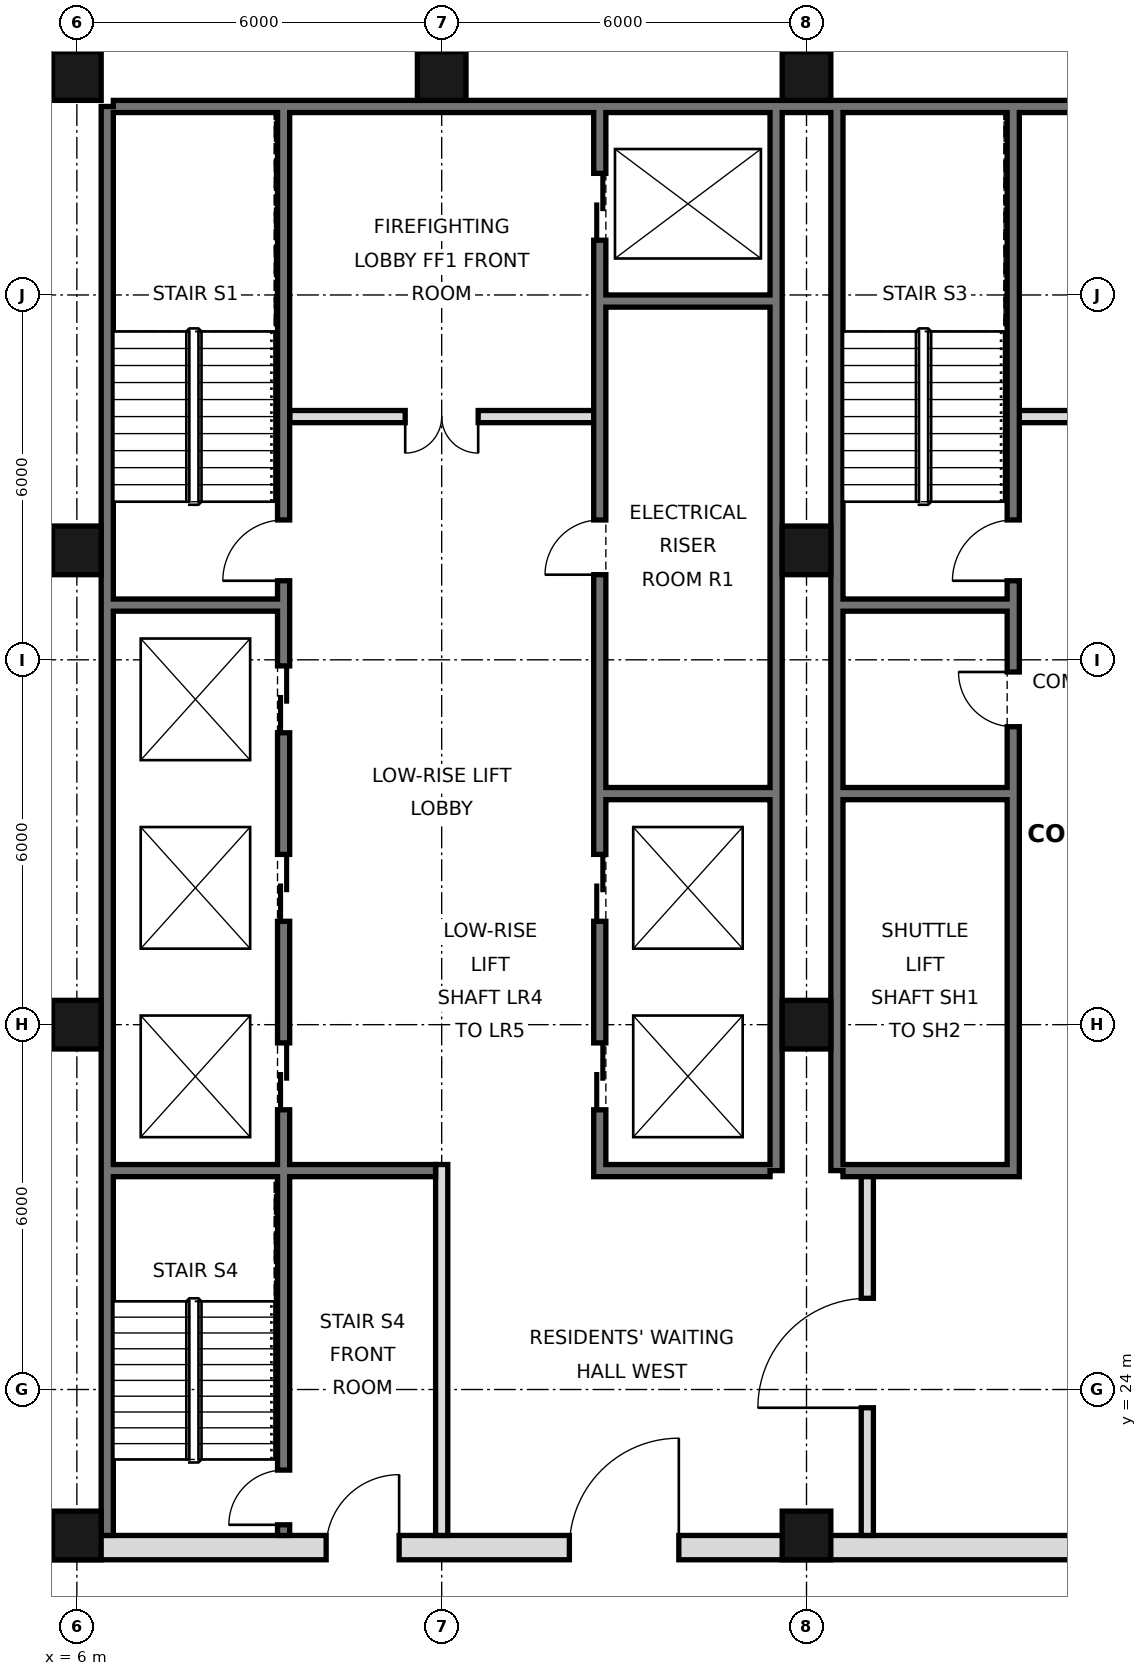
"""IFC4 building model, lengths in metres.
Left out: names, types, materials, properties, quantities, classifications, styles, units other than length and angle.
Written with IfcOpenShell. Run it as: python <this file> out.ifc"""

import sys

from ifc_helpers import new_model, si_unit, direction, frame, frame_2d, origin, origin_2d, place, context, subcontext, project, spatial, rectangle, hollow_rectangle, extrude, element, fill, save


model = new_model("IFC4")
c1 = context("Model", 3, precision=1e-05, world=origin(), true_north=direction((0.0, 1.0)))
c2 = subcontext(c1, "Body", "Model", "MODEL_VIEW")
j1 = project(units=[si_unit("LENGTHUNIT", "METRE"), si_unit("PLANEANGLEUNIT", "RADIAN")], contexts=[c1])
p1 = place(None, origin())
s1 = spatial("IfcSite", under=j1, at=p1, CompositionType="ELEMENT")
p2 = place(p1, origin())
s2 = spatial("IfcBuilding", under=s1, at=p2, CompositionType="ELEMENT")
p3 = place(p2, frame((0.0, 0.0, 158.2)))
s3 = spatial("IfcBuildingStorey", under=s2, at=p3, CompositionType="ELEMENT", Elevation=158.2)
for number, where, z_axis, x_axis in (
    (1, (6.0, 21.6, 0.0), (0.0, 0.0, 1.0), (1.0, 0.0, 0.0)),
    (2, (6.0, 30.0, 0.0), (0.0, 0.0, 1.0), (1.0, 0.0, 0.0)),
    (3, (6.0, 37.8, 0.0), (0.0, 0.0, 1.0), (1.0, 0.0, 0.0)),
    (4, (6.0, 45.6, 0.0), (0.0, 0.0, 1.0), (1.0, 0.0, 0.0)),
    (5, (12.0, 45.6, 0.0), (0.0, 0.0, 1.0), (1.0, 0.0, 0.0)),
    (6, (18.0, 21.6, 0.0), (0.0, 0.0, 1.0), (1.0, 0.0, 0.0)),
    (7, (18.0, 30.0, 0.0), (0.0, 0.0, 1.0), (1.0, 0.0, 0.0)),
    (8, (18.0, 37.8, 0.0), (0.0, 0.0, 1.0), (1.0, 0.0, 0.0)),
    (9, (18.0, 45.6, 0.0), (0.0, 0.0, 1.0), (1.0, 0.0, 0.0)),
):
    element("IfcColumn", number, at=place(p3, frame(where, z_axis=z_axis, x_axis=x_axis)), inside=s3, PredefinedType="COLUMN", context=c2, shape_type="SweptSolid", body=[
        extrude(hollow_rectangle(XDim=0.8, YDim=0.8, WallThickness=0.045, at=origin_2d()), origin(), (0.0, 0.0, 1.0), 3.6),
    ])
p4 = place(p3, frame((6.5, 21.6, 0.0), z_axis=(0.0, 0.0, 1.0), x_axis=(0.0, 1.0, 0.0)))
e10 = element("IfcWall", 10, at=p4, inside=s3, PredefinedType="SOLIDWALL", context=c2, shape_type="SweptSolid", body=[
    extrude(rectangle(XDim=23.5, YDim=0.2, at=frame_2d((11.75, 0.0))), origin(), (0.0, 0.0, 1.0), 3.38),
])
p5 = place(p3, frame((6.6, 45.1, 0.0), z_axis=(0.0, 0.0, 1.0), x_axis=(1.0, 0.0, 0.0)))
e11 = element("IfcWall", 11, at=p5, inside=s3, PredefinedType="SOLIDWALL", context=c2, shape_type="SweptSolid", body=[
    extrude(rectangle(XDim=34.8, YDim=0.2, at=frame_2d((17.4, 0.0))), origin(), (0.0, 0.0, 1.0), 3.38),
])
for number, where, z_axis, x_axis in (
    (12, (17.5, 27.6, 0.0), (0.0, 0.0, 1.0), (0.0, 1.0, 0.0)),
    (13, (18.5, 27.6, 0.0), (0.0, 0.0, 1.0), (0.0, 1.0, 0.0)),
):
    element("IfcWall", number, at=place(p3, frame(where, z_axis=z_axis, x_axis=x_axis)), inside=s3, PredefinedType="SOLIDWALL", context=c2, shape_type="SweptSolid", body=[
        extrude(rectangle(XDim=17.5, YDim=0.2, at=frame_2d((8.75, 0.0))), origin(), (0.0, 0.0, 1.0), 3.38),
    ])
p6 = place(p3, frame((5.6, 21.4, 0.0), z_axis=(0.0, 0.0, 1.0), x_axis=(1.0, 0.0, 0.0)))
e14 = element("IfcWall", 14, at=p6, inside=s3, PredefinedType="SOLIDWALL", context=c2, shape_type="SweptSolid", body=[
    extrude(rectangle(XDim=36.8, YDim=0.4, at=frame_2d((18.4, 0.0))), origin(), (0.0, 0.0, 1.0), 3.38),
])
p7 = place(p6, frame((8.5, 0.0, 0.0)))
e15 = element("IfcOpeningElement", 15, at=p7, cuts=e14, PredefinedType="OPENING", context=c2, shape_type="SweptSolid", body=[
    extrude(rectangle(XDim=1.8, YDim=2.1, at=frame_2d((0.9, 1.05))), frame((0.0, 0.21, 0.0), z_axis=(0.0, -1.0, 0.0), x_axis=(1.0, 0.0, 0.0)), (0.0, 0.0, 1.0), 0.42),
])
p8 = place(p6, frame((17.5, 0.0, 0.0)))
e16 = element("IfcOpeningElement", 16, at=p8, cuts=e14, PredefinedType="OPENING", context=c2, shape_type="SweptSolid", body=[
    extrude(rectangle(XDim=1.8, YDim=2.1, at=frame_2d((0.9, 1.05))), frame((0.0, 0.21, 0.0), z_axis=(0.0, -1.0, 0.0), x_axis=(1.0, 0.0, 0.0)), (0.0, 0.0, 1.0), 0.42),
])
p9 = place(p6, frame((26.5, 0.0, 0.0)))
e17 = element("IfcOpeningElement", 17, at=p9, cuts=e14, PredefinedType="OPENING", context=c2, shape_type="SweptSolid", body=[
    extrude(rectangle(XDim=1.8, YDim=2.1, at=frame_2d((0.9, 1.05))), frame((0.0, 0.21, 0.0), z_axis=(0.0, -1.0, 0.0), x_axis=(1.0, 0.0, 0.0)), (0.0, 0.0, 1.0), 0.42),
])
p10 = place(p6, frame((4.5, 0.0, 0.0)))
e18 = element("IfcOpeningElement", 18, at=p10, cuts=e14, PredefinedType="OPENING", context=c2, shape_type="SweptSolid", body=[
    extrude(rectangle(XDim=1.2, YDim=2.1, at=frame_2d((0.6, 1.05))), frame((0.0, 0.21, 0.0), z_axis=(0.0, -1.0, 0.0), x_axis=(1.0, 0.0, 0.0)), (0.0, 0.0, 1.0), 0.42),
])
p11 = place(p6, frame((31.1, 0.0, 0.0)))
e19 = element("IfcOpeningElement", 19, at=p11, cuts=e14, PredefinedType="OPENING", context=c2, shape_type="SweptSolid", body=[
    extrude(rectangle(XDim=1.2, YDim=2.1, at=frame_2d((0.6, 1.05))), frame((0.0, 0.21, 0.0), z_axis=(0.0, -1.0, 0.0), x_axis=(1.0, 0.0, 0.0)), (0.0, 0.0, 1.0), 0.42),
])
p12 = place(p3, frame((19.0, 21.6, 0.0), z_axis=(0.0, 0.0, 1.0), x_axis=(0.0, 1.0, 0.0)))
e20 = element("IfcWall", 20, at=p12, inside=s3, PredefinedType="PARTITIONING", context=c2, shape_type="SweptSolid", body=[
    extrude(rectangle(XDim=6.0, YDim=0.2, at=frame_2d((3.0, 0.0))), origin(), (0.0, 0.0, 1.0), 3.38),
])
p13 = place(p12, frame((2.1, 0.0, 0.0)))
e21 = element("IfcOpeningElement", 21, at=p13, cuts=e20, PredefinedType="OPENING", context=c2, shape_type="SweptSolid", body=[
    extrude(rectangle(XDim=1.8, YDim=2.1, at=frame_2d((0.9, 1.05))), frame((0.0, 0.11, 0.0), z_axis=(0.0, -1.0, 0.0), x_axis=(1.0, 0.0, 0.0)), (0.0, 0.0, 1.0), 0.22),
])
p14 = place(p3, frame((12.0, 21.6, 0.0), z_axis=(0.0, 0.0, 1.0), x_axis=(0.0, 1.0, 0.0)))
e22 = element("IfcWall", 22, at=p14, inside=s3, PredefinedType="PARTITIONING", context=c2, shape_type="SweptSolid", body=[
    extrude(rectangle(XDim=6.1, YDim=0.2, at=frame_2d((3.05, 0.0))), origin(), (0.0, 0.0, 1.0), 3.38),
])
p15 = place(p3, frame((14.6, 27.5, 0.0), z_axis=(0.0, 0.0, 1.0), x_axis=(0.0, 1.0, 0.0)))
e23 = element("IfcWall", 23, at=p15, inside=s3, PredefinedType="SOLIDWALL", context=c2, shape_type="SweptSolid", body=[
    extrude(rectangle(XDim=17.5, YDim=0.2, at=frame_2d((8.75, 0.0))), origin(), (0.0, 0.0, 1.0), 3.38),
])
p16 = place(p15, frame((1.1, 0.0, 0.0)))
e24 = element("IfcOpeningElement", 24, at=p16, cuts=e23, PredefinedType="OPENING", context=c2, shape_type="SweptSolid", body=[
    extrude(rectangle(XDim=1.1, YDim=2.1, at=frame_2d((0.55, 1.05))), frame((0.0, 0.11, 0.0), z_axis=(0.0, -1.0, 0.0), x_axis=(1.0, 0.0, 0.0)), (0.0, 0.0, 1.0), 0.22),
])
p17 = place(p15, frame((4.2, 0.0, 0.0)))
e25 = element("IfcOpeningElement", 25, at=p17, cuts=e23, PredefinedType="OPENING", context=c2, shape_type="SweptSolid", body=[
    extrude(rectangle(XDim=1.1, YDim=2.1, at=frame_2d((0.55, 1.05))), frame((0.0, 0.11, 0.0), z_axis=(0.0, -1.0, 0.0), x_axis=(1.0, 0.0, 0.0)), (0.0, 0.0, 1.0), 0.22),
])
p18 = place(p15, frame((15.4, 0.0, 0.0)))
e26 = element("IfcOpeningElement", 26, at=p18, cuts=e23, PredefinedType="OPENING", context=c2, shape_type="SweptSolid", body=[
    extrude(rectangle(XDim=1.1, YDim=2.1, at=frame_2d((0.55, 1.05))), frame((0.0, 0.11, 0.0), z_axis=(0.0, -1.0, 0.0), x_axis=(1.0, 0.0, 0.0)), (0.0, 0.0, 1.0), 0.22),
])
p19 = place(p15, frame((9.9, 0.0, 0.0)))
e27 = element("IfcOpeningElement", 27, at=p19, cuts=e23, PredefinedType="OPENING", context=c2, shape_type="SweptSolid", body=[
    extrude(rectangle(XDim=0.9, YDim=2.1, at=frame_2d((0.45, 1.05))), frame((0.0, 0.11, 0.0), z_axis=(0.0, -1.0, 0.0), x_axis=(1.0, 0.0, 0.0)), (0.0, 0.0, 1.0), 0.22),
])
p20 = place(p3, frame((21.4, 27.5, 0.0), z_axis=(0.0, 0.0, 1.0), x_axis=(0.0, 1.0, 0.0)))
e28 = element("IfcWall", 28, at=p20, inside=s3, PredefinedType="SOLIDWALL", context=c2, shape_type="SweptSolid", body=[
    extrude(rectangle(XDim=17.5, YDim=0.2, at=frame_2d((8.75, 0.0))), origin(), (0.0, 0.0, 1.0), 3.38),
])
p21 = place(p20, frame((9.8, 0.0, 0.0)))
e29 = element("IfcOpeningElement", 29, at=p21, cuts=e28, PredefinedType="OPENING", context=c2, shape_type="SweptSolid", body=[
    extrude(rectangle(XDim=1.0, YDim=2.1, at=frame_2d((0.5, 1.05))), frame((0.0, 0.11, 0.0), z_axis=(0.0, -1.0, 0.0), x_axis=(1.0, 0.0, 0.0)), (0.0, 0.0, 1.0), 0.22),
])
p22 = place(p20, frame((7.4, 0.0, 0.0)))
e30 = element("IfcOpeningElement", 30, at=p22, cuts=e28, PredefinedType="OPENING", context=c2, shape_type="SweptSolid", body=[
    extrude(rectangle(XDim=0.9, YDim=2.1, at=frame_2d((0.45, 1.05))), frame((0.0, 0.11, 0.0), z_axis=(0.0, -1.0, 0.0), x_axis=(1.0, 0.0, 0.0)), (0.0, 0.0, 1.0), 0.22),
])
p23 = place(p3, frame((9.4, 21.6, 0.0), z_axis=(0.0, 0.0, 1.0), x_axis=(0.0, 1.0, 0.0)))
e31 = element("IfcWall", 31, at=p23, inside=s3, PredefinedType="SOLIDWALL", context=c2, shape_type="SweptSolid", body=[
    extrude(rectangle(XDim=23.4, YDim=0.2, at=frame_2d((11.7, 0.0))), origin(), (0.0, 0.0, 1.0), 3.38),
])
p24 = place(p23, frame((7.0, 0.0, 0.0)))
e32 = element("IfcOpeningElement", 32, at=p24, cuts=e31, PredefinedType="OPENING", context=c2, shape_type="SweptSolid", body=[
    extrude(rectangle(XDim=1.1, YDim=2.1, at=frame_2d((0.55, 1.05))), frame((0.0, 0.11, 0.0), z_axis=(0.0, -1.0, 0.0), x_axis=(1.0, 0.0, 0.0)), (0.0, 0.0, 1.0), 0.22),
])
p25 = place(p23, frame((10.1, 0.0, 0.0)))
e33 = element("IfcOpeningElement", 33, at=p25, cuts=e31, PredefinedType="OPENING", context=c2, shape_type="SweptSolid", body=[
    extrude(rectangle(XDim=1.1, YDim=2.1, at=frame_2d((0.55, 1.05))), frame((0.0, 0.11, 0.0), z_axis=(0.0, -1.0, 0.0), x_axis=(1.0, 0.0, 0.0)), (0.0, 0.0, 1.0), 0.22),
])
p26 = place(p23, frame((13.2, 0.0, 0.0)))
e34 = element("IfcOpeningElement", 34, at=p26, cuts=e31, PredefinedType="OPENING", context=c2, shape_type="SweptSolid", body=[
    extrude(rectangle(XDim=1.1, YDim=2.1, at=frame_2d((0.55, 1.05))), frame((0.0, 0.11, 0.0), z_axis=(0.0, -1.0, 0.0), x_axis=(1.0, 0.0, 0.0)), (0.0, 0.0, 1.0), 0.22),
])
p27 = place(p23, frame((15.7, 0.0, 0.0)))
e35 = element("IfcOpeningElement", 35, at=p27, cuts=e31, PredefinedType="OPENING", context=c2, shape_type="SweptSolid", body=[
    extrude(rectangle(XDim=1.0, YDim=2.1, at=frame_2d((0.5, 1.05))), frame((0.0, 0.11, 0.0), z_axis=(0.0, -1.0, 0.0), x_axis=(1.0, 0.0, 0.0)), (0.0, 0.0, 1.0), 0.22),
])
p28 = place(p23, frame((0.175, 0.0, 0.0)))
e36 = element("IfcOpeningElement", 36, at=p28, cuts=e31, PredefinedType="OPENING", context=c2, shape_type="SweptSolid", body=[
    extrude(rectangle(XDim=0.9, YDim=2.1, at=frame_2d((0.45, 1.05))), frame((0.0, 0.11, 0.0), z_axis=(0.0, -1.0, 0.0), x_axis=(1.0, 0.0, 0.0)), (0.0, 0.0, 1.0), 0.22),
])
for number, where, z_axis, x_axis in (
    (37, (14.7, 27.6, 0.0), (0.0, 0.0, 1.0), (1.0, 0.0, 0.0)),
    (38, (18.6, 27.6, 0.0), (0.0, 0.0, 1.0), (1.0, 0.0, 0.0)),
):
    element("IfcWall", number, at=place(p3, frame(where, z_axis=z_axis, x_axis=x_axis)), inside=s3, PredefinedType="SOLIDWALL", context=c2, shape_type="SweptSolid", body=[
        extrude(rectangle(XDim=2.7, YDim=0.2, at=frame_2d((1.35, 0.0))), origin(), (0.0, 0.0, 1.0), 3.38),
    ])
p29 = place(p3, frame((6.6, 27.6, 0.0), z_axis=(0.0, 0.0, 1.0), x_axis=(1.0, 0.0, 0.0)))
e39 = element("IfcWall", 39, at=p29, inside=s3, PredefinedType="SOLIDWALL", context=c2, shape_type="SweptSolid", body=[
    extrude(rectangle(XDim=5.3, YDim=0.2, at=frame_2d((2.65, 0.0))), origin(), (0.0, 0.0, 1.0), 3.38),
])
for number, where, z_axis, x_axis in (
    (40, (14.7, 33.8, 0.0), (0.0, 0.0, 1.0), (1.0, 0.0, 0.0)),
    (41, (18.6, 33.8, 0.0), (0.0, 0.0, 1.0), (1.0, 0.0, 0.0)),
    (42, (18.6, 36.9, 0.0), (0.0, 0.0, 1.0), (1.0, 0.0, 0.0)),
    (43, (6.6, 36.9, 0.0), (0.0, 0.0, 1.0), (1.0, 0.0, 0.0)),
):
    element("IfcWall", number, at=place(p3, frame(where, z_axis=z_axis, x_axis=x_axis)), inside=s3, PredefinedType="SOLIDWALL", context=c2, shape_type="SweptSolid", body=[
        extrude(rectangle(XDim=2.7, YDim=0.2, at=frame_2d((1.35, 0.0))), origin(), (0.0, 0.0, 1.0), 3.38),
    ])
p30 = place(p3, frame((21.5, 40.0, 0.0), z_axis=(0.0, 0.0, 1.0), x_axis=(1.0, 0.0, 0.0)))
e44 = element("IfcWall", 44, at=p30, inside=s3, PredefinedType="PARTITIONING", context=c2, shape_type="SweptSolid", body=[
    extrude(rectangle(XDim=5.0, YDim=0.2, at=frame_2d((2.5, 0.0))), origin(), (0.0, 0.0, 1.0), 3.38),
])
p31 = place(p30, frame((1.9, 0.0, 0.0)))
e45 = element("IfcOpeningElement", 45, at=p31, cuts=e44, PredefinedType="OPENING", context=c2, shape_type="SweptSolid", body=[
    extrude(rectangle(XDim=1.2, YDim=2.1, at=frame_2d((0.6, 1.05))), frame((0.0, 0.11, 0.0), z_axis=(0.0, -1.0, 0.0), x_axis=(1.0, 0.0, 0.0)), (0.0, 0.0, 1.0), 0.22),
])
p32 = place(p3, frame((9.5, 40.0, 0.0), z_axis=(0.0, 0.0, 1.0), x_axis=(1.0, 0.0, 0.0)))
e46 = element("IfcWall", 46, at=p32, inside=s3, PredefinedType="PARTITIONING", context=c2, shape_type="SweptSolid", body=[
    extrude(rectangle(XDim=5.0, YDim=0.2, at=frame_2d((2.5, 0.0))), origin(), (0.0, 0.0, 1.0), 3.38),
])
p33 = place(p32, frame((1.9, 0.0, 0.0)))
e47 = element("IfcOpeningElement", 47, at=p33, cuts=e46, PredefinedType="OPENING", context=c2, shape_type="SweptSolid", body=[
    extrude(rectangle(XDim=1.2, YDim=2.1, at=frame_2d((0.6, 1.05))), frame((0.0, 0.11, 0.0), z_axis=(0.0, -1.0, 0.0), x_axis=(1.0, 0.0, 0.0)), (0.0, 0.0, 1.0), 0.22),
])
p34 = place(p3, frame((14.7, 41.9, 0.0), z_axis=(0.0, 0.0, 1.0), x_axis=(1.0, 0.0, 0.0)))
e48 = element("IfcWall", 48, at=p34, inside=s3, PredefinedType="SOLIDWALL", context=c2, shape_type="SweptSolid", body=[
    extrude(rectangle(XDim=2.7, YDim=0.2, at=frame_2d((1.35, 0.0))), origin(), (0.0, 0.0, 1.0), 3.38),
])
p35 = place(p7, frame((1.8, 0.0, 0.0), z_axis=(0.0, 0.0, 1.0), x_axis=(-1.0, 0.0, 0.0)))
e49 = element("IfcDoor", 49, at=p35, inside=s3, OperationType="SINGLE_SWING_LEFT", PredefinedType="DOOR", context=c2, shape_type="SweptSolid", body=[
    extrude(rectangle(XDim=1.8, YDim=2.1, at=frame_2d((0.9, 1.05))), frame((0.0, 0.025, 0.0), z_axis=(0.0, -1.0, 0.0), x_axis=(1.0, 0.0, 0.0)), (0.0, 0.0, 1.0), 0.05),
])
fill(e15, e49)
p36 = place(p13, origin())
e50 = element("IfcDoor", 50, at=p36, inside=s3, OperationType="SINGLE_SWING_LEFT", PredefinedType="DOOR", context=c2, shape_type="SweptSolid", body=[
    extrude(rectangle(XDim=1.8, YDim=2.1, at=frame_2d((0.9, 1.05))), frame((0.0, 0.025, 0.0), z_axis=(0.0, -1.0, 0.0), x_axis=(1.0, 0.0, 0.0)), (0.0, 0.0, 1.0), 0.05),
])
fill(e21, e50)
p37 = place(p10, frame((1.2, 0.0, 0.0), z_axis=(0.0, 0.0, 1.0), x_axis=(-1.0, 0.0, 0.0)))
e51 = element("IfcDoor", 51, at=p37, inside=s3, OperationType="SINGLE_SWING_LEFT", PredefinedType="DOOR", context=c2, shape_type="SweptSolid", body=[
    extrude(rectangle(XDim=1.2, YDim=2.1, at=frame_2d((0.6, 1.05))), frame((0.0, 0.025, 0.0), z_axis=(0.0, -1.0, 0.0), x_axis=(1.0, 0.0, 0.0)), (0.0, 0.0, 1.0), 0.05),
])
fill(e18, e51)
p38 = place(p33, frame((1.2, 0.0, 0.0), z_axis=(0.0, 0.0, 1.0), x_axis=(-1.0, 0.0, 0.0)))
e52 = element("IfcDoor", 52, at=p38, inside=s3, OperationType="DOUBLE_DOOR_SINGLE_SWING", PredefinedType="DOOR", context=c2, shape_type="SweptSolid", body=[
    extrude(rectangle(XDim=1.2, YDim=2.1, at=frame_2d((0.6, 1.05))), frame((0.0, 0.025, 0.0), z_axis=(0.0, -1.0, 0.0), x_axis=(1.0, 0.0, 0.0)), (0.0, 0.0, 1.0), 0.05),
])
fill(e47, e52)
p39 = place(p16, origin())
e53 = element("IfcDoor", 53, at=p39, inside=s3, OperationType="DOUBLE_DOOR_SLIDING", PredefinedType="DOOR", context=c2, shape_type="SweptSolid", body=[
    extrude(rectangle(XDim=1.1, YDim=2.1, at=frame_2d((0.55, 1.05))), frame((0.0, 0.025, 0.0), z_axis=(0.0, -1.0, 0.0), x_axis=(1.0, 0.0, 0.0)), (0.0, 0.0, 1.0), 0.05),
])
fill(e24, e53)
p40 = place(p17, origin())
e54 = element("IfcDoor", 54, at=p40, inside=s3, OperationType="DOUBLE_DOOR_SLIDING", PredefinedType="DOOR", context=c2, shape_type="SweptSolid", body=[
    extrude(rectangle(XDim=1.1, YDim=2.1, at=frame_2d((0.55, 1.05))), frame((0.0, 0.025, 0.0), z_axis=(0.0, -1.0, 0.0), x_axis=(1.0, 0.0, 0.0)), (0.0, 0.0, 1.0), 0.05),
])
fill(e25, e54)
p41 = place(p18, origin())
e55 = element("IfcDoor", 55, at=p41, inside=s3, OperationType="DOUBLE_DOOR_SLIDING", PredefinedType="DOOR", context=c2, shape_type="SweptSolid", body=[
    extrude(rectangle(XDim=1.1, YDim=2.1, at=frame_2d((0.55, 1.05))), frame((0.0, 0.025, 0.0), z_axis=(0.0, -1.0, 0.0), x_axis=(1.0, 0.0, 0.0)), (0.0, 0.0, 1.0), 0.05),
])
fill(e26, e55)
p42 = place(p24, origin())
e56 = element("IfcDoor", 56, at=p42, inside=s3, OperationType="DOUBLE_DOOR_SLIDING", PredefinedType="DOOR", context=c2, shape_type="SweptSolid", body=[
    extrude(rectangle(XDim=1.1, YDim=2.1, at=frame_2d((0.55, 1.05))), frame((0.0, 0.025, 0.0), z_axis=(0.0, -1.0, 0.0), x_axis=(1.0, 0.0, 0.0)), (0.0, 0.0, 1.0), 0.05),
])
fill(e32, e56)
p43 = place(p25, origin())
e57 = element("IfcDoor", 57, at=p43, inside=s3, OperationType="DOUBLE_DOOR_SLIDING", PredefinedType="DOOR", context=c2, shape_type="SweptSolid", body=[
    extrude(rectangle(XDim=1.1, YDim=2.1, at=frame_2d((0.55, 1.05))), frame((0.0, 0.025, 0.0), z_axis=(0.0, -1.0, 0.0), x_axis=(1.0, 0.0, 0.0)), (0.0, 0.0, 1.0), 0.05),
])
fill(e33, e57)
p44 = place(p26, origin())
e58 = element("IfcDoor", 58, at=p44, inside=s3, OperationType="DOUBLE_DOOR_SLIDING", PredefinedType="DOOR", context=c2, shape_type="SweptSolid", body=[
    extrude(rectangle(XDim=1.1, YDim=2.1, at=frame_2d((0.55, 1.05))), frame((0.0, 0.025, 0.0), z_axis=(0.0, -1.0, 0.0), x_axis=(1.0, 0.0, 0.0)), (0.0, 0.0, 1.0), 0.05),
])
fill(e34, e58)
p45 = place(p27, origin())
e59 = element("IfcDoor", 59, at=p45, inside=s3, OperationType="SINGLE_SWING_LEFT", PredefinedType="DOOR", context=c2, shape_type="SweptSolid", body=[
    extrude(rectangle(XDim=1.0, YDim=2.1, at=frame_2d((0.5, 1.05))), frame((0.0, 0.025, 0.0), z_axis=(0.0, -1.0, 0.0), x_axis=(1.0, 0.0, 0.0)), (0.0, 0.0, 1.0), 0.05),
])
fill(e35, e59)
p46 = place(p21, origin())
e60 = element("IfcDoor", 60, at=p46, inside=s3, OperationType="SINGLE_SWING_LEFT", PredefinedType="DOOR", context=c2, shape_type="SweptSolid", body=[
    extrude(rectangle(XDim=1.0, YDim=2.1, at=frame_2d((0.5, 1.05))), frame((0.0, 0.025, 0.0), z_axis=(0.0, -1.0, 0.0), x_axis=(1.0, 0.0, 0.0)), (0.0, 0.0, 1.0), 0.05),
])
fill(e29, e60)
p47 = place(p28, origin())
e61 = element("IfcDoor", 61, at=p47, inside=s3, OperationType="SINGLE_SWING_LEFT", PredefinedType="DOOR", context=c2, shape_type="SweptSolid", body=[
    extrude(rectangle(XDim=0.9, YDim=2.1, at=frame_2d((0.45, 1.05))), frame((0.0, 0.025, 0.0), z_axis=(0.0, -1.0, 0.0), x_axis=(1.0, 0.0, 0.0)), (0.0, 0.0, 1.0), 0.05),
])
fill(e36, e61)
p48 = place(p19, origin())
e62 = element("IfcDoor", 62, at=p48, inside=s3, OperationType="SINGLE_SWING_LEFT", PredefinedType="DOOR", context=c2, shape_type="SweptSolid", body=[
    extrude(rectangle(XDim=0.9, YDim=2.1, at=frame_2d((0.45, 1.05))), frame((0.0, 0.025, 0.0), z_axis=(0.0, -1.0, 0.0), x_axis=(1.0, 0.0, 0.0)), (0.0, 0.0, 1.0), 0.05),
])
fill(e27, e62)
p49 = place(p22, frame((0.9, 0.0, 0.0), z_axis=(0.0, 0.0, 1.0), x_axis=(-1.0, 0.0, 0.0)))
e63 = element("IfcDoor", 63, at=p49, inside=s3, OperationType="SINGLE_SWING_LEFT", PredefinedType="DOOR", context=c2, shape_type="SweptSolid", body=[
    extrude(rectangle(XDim=0.9, YDim=2.1, at=frame_2d((0.45, 1.05))), frame((0.0, 0.025, 0.0), z_axis=(0.0, -1.0, 0.0), x_axis=(1.0, 0.0, 0.0)), (0.0, 0.0, 1.0), 0.05),
])
fill(e30, e63)
save(model, sys.argv[1])
